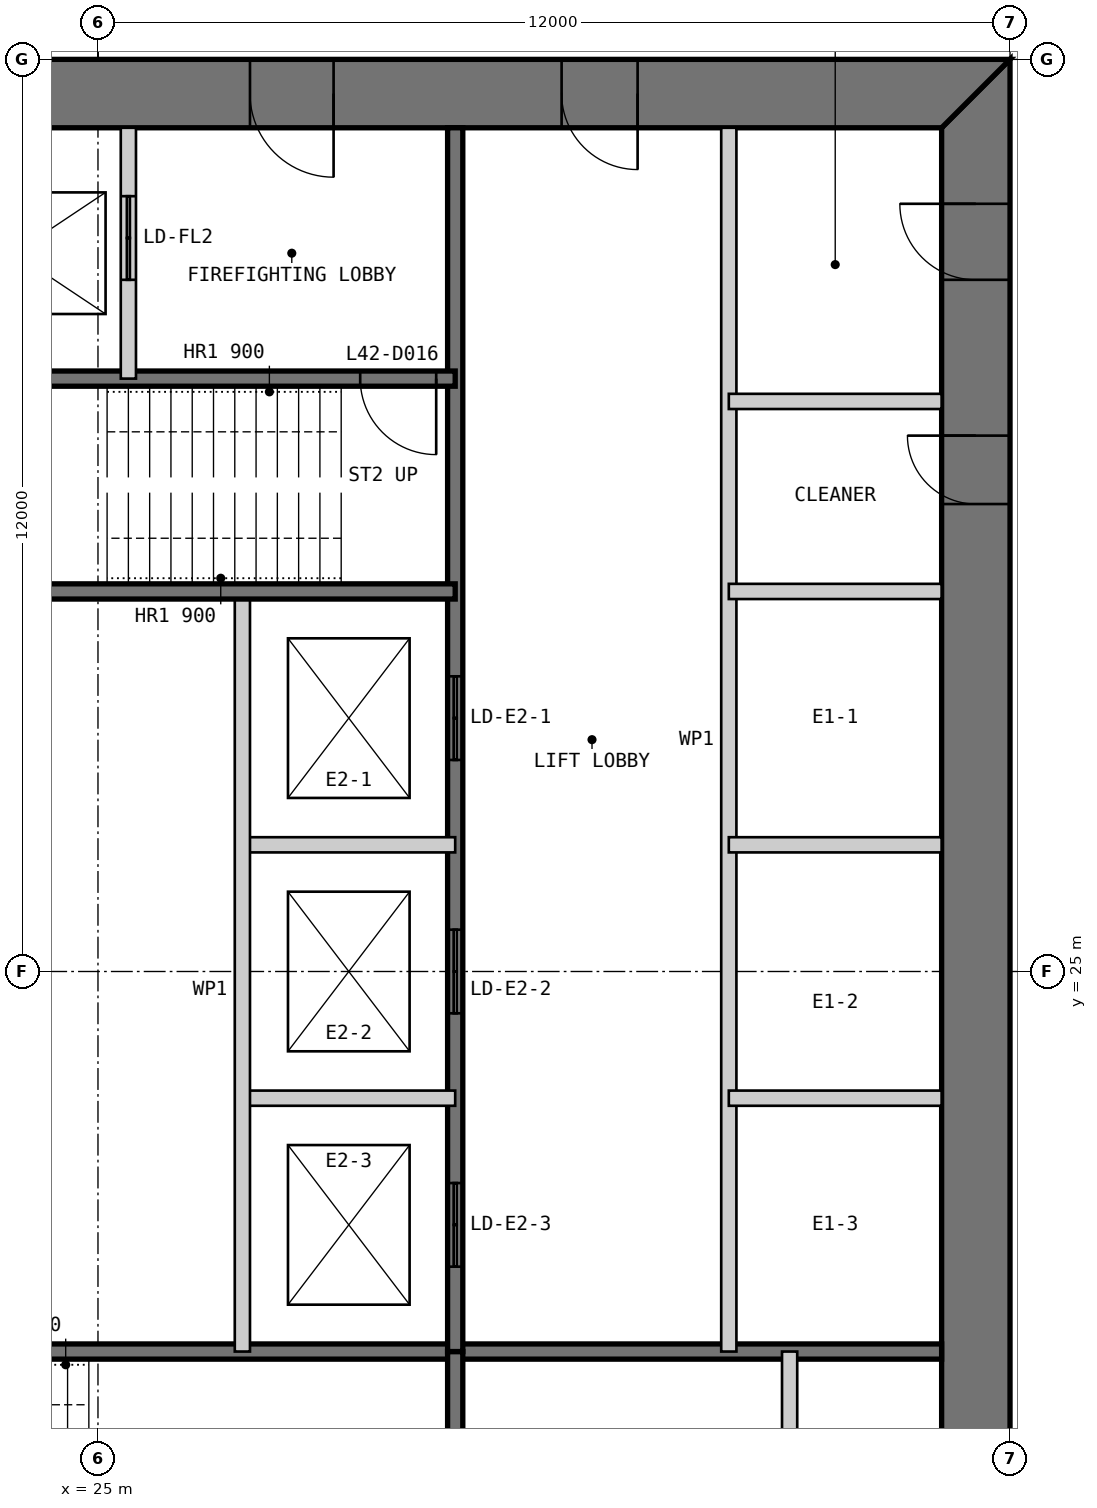
"""IFC4 building model, lengths in metres.
Left out: names, types, materials, properties, quantities, classifications, styles, units other than length and angle.
Written with IfcOpenShell. Run it as: python <this file> out.ifc"""

import sys

from ifc_helpers import new_model, si_unit, direction, frame, frame_2d, origin, place, context, subcontext, project, spatial, polyline, rectangle, outline, extrude, element, fill, save


model = new_model("IFC4")
c1 = context("Model", 3, precision=1e-05, world=origin(), true_north=direction((0.0, 1.0)))
c2 = subcontext(c1, "Body", "Model", "MODEL_VIEW")
j1 = project(units=[si_unit("LENGTHUNIT", "METRE"), si_unit("PLANEANGLEUNIT", "RADIAN")], contexts=[c1])
p1 = place(None, origin())
s1 = spatial("IfcSite", under=j1, at=p1, CompositionType="ELEMENT")
p2 = place(p1, origin())
s2 = spatial("IfcBuilding", under=s1, at=p2, CompositionType="ELEMENT")
p3 = place(p2, frame((0.0, 0.0, 181.8)))
s3 = spatial("IfcBuildingStorey", under=s2, at=p3, CompositionType="ELEMENT", Elevation=181.8)
p4 = place(p3, frame((36.55, 13.9, 0.0), z_axis=(0.0, 0.0, 1.0), x_axis=(0.0, 1.0, 0.0)))
e1 = element("IfcWall", 1, at=p4, inside=s3, PredefinedType="SHEAR", context=c2, shape_type="SweptSolid", body=[
    extrude(outline(polyline([(-0.9, -0.45), (23.1, -0.45), (22.2, 0.45), (0.0, 0.45), (-0.9, -0.45)])), origin(), (0.0, 0.0, 1.0), 4.0),
])
p5 = place(p4, frame((20.2, 0.0, 0.0)))
e2 = element("IfcOpeningElement", 2, at=p5, cuts=e1, PredefinedType="OPENING", context=c2, shape_type="SweptSolid", body=[
    extrude(rectangle(XDim=1.0, YDim=2.2, at=frame_2d((0.5, 1.1))), frame((0.0, 0.46, 0.0), z_axis=(0.0, -1.0, 0.0), x_axis=(1.0, 0.0, 0.0)), (0.0, 0.0, 1.0), 0.92),
])
p6 = place(p4, frame((17.25, 0.0, 0.0)))
e3 = element("IfcOpeningElement", 3, at=p6, cuts=e1, PredefinedType="OPENING", context=c2, shape_type="SweptSolid", body=[
    extrude(rectangle(XDim=0.9, YDim=2.2, at=frame_2d((0.45, 1.1))), frame((0.0, 0.46, 0.0), z_axis=(0.0, -1.0, 0.0), x_axis=(1.0, 0.0, 0.0)), (0.0, 0.0, 1.0), 0.92),
])
p7 = place(p3, frame((37.0, 36.55, 0.0), z_axis=(0.0, 0.0, 1.0), x_axis=(-1.0, 0.0, 0.0)))
e4 = element("IfcWall", 4, at=p7, inside=s3, PredefinedType="SHEAR", context=c2, shape_type="SweptSolid", body=[
    extrude(outline(polyline([(0.0, -0.45), (24.0, -0.45), (23.1, 0.45), (0.9, 0.45), (0.0, -0.45)])), origin(), (0.0, 0.0, 1.0), 4.0),
])
p8 = place(p7, frame((4.9, 0.0, 0.0)))
e5 = element("IfcOpeningElement", 5, at=p8, cuts=e4, PredefinedType="OPENING", context=c2, shape_type="SweptSolid", body=[
    extrude(rectangle(XDim=1.0, YDim=2.2, at=frame_2d((0.5, 1.1))), frame((0.0, 0.46, 0.0), z_axis=(0.0, -1.0, 0.0), x_axis=(1.0, 0.0, 0.0)), (0.0, 0.0, 1.0), 0.92),
])
p9 = place(p7, frame((8.9, 0.0, 0.0)))
e6 = element("IfcOpeningElement", 6, at=p9, cuts=e4, PredefinedType="OPENING", context=c2, shape_type="SweptSolid", body=[
    extrude(rectangle(XDim=1.1, YDim=2.2, at=frame_2d((0.55, 1.1))), frame((0.0, 0.46, 0.0), z_axis=(0.0, -1.0, 0.0), x_axis=(1.0, 0.0, 0.0)), (0.0, 0.0, 1.0), 0.92),
])
p10 = place(p7, frame((15.05, 0.0, 0.0)))
e7 = element("IfcOpeningElement", 7, at=p10, cuts=e4, PredefinedType="OPENING", context=c2, shape_type="SweptSolid", body=[
    extrude(rectangle(XDim=0.9, YDim=2.2, at=frame_2d((0.45, 1.1))), frame((0.0, 0.46, 0.0), z_axis=(0.0, -1.0, 0.0), x_axis=(1.0, 0.0, 0.0)), (0.0, 0.0, 1.0), 0.92),
])
p11 = place(p7, frame((17.9, 0.0, 0.0)))
e8 = element("IfcOpeningElement", 8, at=p11, cuts=e4, PredefinedType="OPENING", context=c2, shape_type="SweptSolid", body=[
    extrude(rectangle(XDim=1.0, YDim=2.2, at=frame_2d((0.5, 1.1))), frame((0.0, 0.46, 0.0), z_axis=(0.0, -1.0, 0.0), x_axis=(1.0, 0.0, 0.0)), (0.0, 0.0, 1.0), 0.92),
])
p12 = place(p7, frame((21.4, 0.0, 0.0)))
e9 = element("IfcOpeningElement", 9, at=p12, cuts=e4, PredefinedType="OPENING", context=c2, shape_type="SweptSolid", body=[
    extrude(rectangle(XDim=1.0, YDim=2.2, at=frame_2d((0.5, 1.1))), frame((0.0, 0.46, 0.0), z_axis=(0.0, -1.0, 0.0), x_axis=(1.0, 0.0, 0.0)), (0.0, 0.0, 1.0), 0.92),
])
p13 = place(p3, frame((20.3, 20.0, 0.0), z_axis=(0.0, 0.0, 1.0), x_axis=(1.0, 0.0, 0.0)))
e10 = element("IfcWall", 10, at=p13, inside=s3, PredefinedType="SOLIDWALL", context=c2, shape_type="SweptSolid", body=[
    extrude(rectangle(XDim=15.8, YDim=0.2, at=frame_2d((7.9, 0.0))), origin(), (0.0, 0.0, 1.0), 3.8),
])
p14 = place(p3, frame((29.7, 13.9, 0.0), z_axis=(0.0, 0.0, 1.0), x_axis=(0.0, 1.0, 0.0)))
e11 = element("IfcWall", 11, at=p14, inside=s3, PredefinedType="SOLIDWALL", context=c2, shape_type="SweptSolid", body=[
    extrude(rectangle(XDim=6.1, YDim=0.2, at=frame_2d((3.05, 0.0))), origin(), (0.0, 0.0, 1.0), 3.8),
])
p15 = place(p3, frame((34.1, 13.9, 0.0), z_axis=(0.0, 0.0, 1.0), x_axis=(0.0, 1.0, 0.0)))
e12 = element("IfcWall", 12, at=p15, inside=s3, PredefinedType="PARTITIONING", context=c2, shape_type="SweptSolid", body=[
    extrude(rectangle(XDim=6.1, YDim=0.2, at=frame_2d((3.05, 0.0))), origin(), (0.0, 0.0, 1.0), 3.8),
])
p16 = place(p3, frame((33.3, 36.1, 0.0), z_axis=(0.0, 0.0, 1.0), x_axis=(0.0, -1.0, 0.0)))
e13 = element("IfcWall", 13, at=p16, inside=s3, PredefinedType="PARTITIONING", context=c2, shape_type="SweptSolid", body=[
    extrude(rectangle(XDim=16.1, YDim=0.2, at=frame_2d((8.05, 0.0))), origin(), (0.0, 0.0, 1.0), 3.8),
])
p17 = place(p3, frame((29.7, 36.1, 0.0), z_axis=(0.0, 0.0, 1.0), x_axis=(0.0, -1.0, 0.0)))
e14 = element("IfcWall", 14, at=p17, inside=s3, PredefinedType="SOLIDWALL", context=c2, shape_type="SweptSolid", body=[
    extrude(rectangle(XDim=16.1, YDim=0.2, at=frame_2d((8.05, 0.0))), origin(), (0.0, 0.0, 1.0), 3.8),
])
p18 = place(p17, frame((7.217, 0.0, 0.0)))
e15 = element("IfcOpeningElement", 15, at=p18, cuts=e14, PredefinedType="OPENING", context=c2, shape_type="SweptSolid", body=[
    extrude(rectangle(XDim=1.1, YDim=2.2, at=frame_2d((0.55, 1.1))), frame((0.0, 0.11, 0.0), z_axis=(0.0, -1.0, 0.0), x_axis=(1.0, 0.0, 0.0)), (0.0, 0.0, 1.0), 0.22),
])
p19 = place(p17, frame((10.55, 0.0, 0.0)))
e16 = element("IfcOpeningElement", 16, at=p19, cuts=e14, PredefinedType="OPENING", context=c2, shape_type="SweptSolid", body=[
    extrude(rectangle(XDim=1.1, YDim=2.2, at=frame_2d((0.55, 1.1))), frame((0.0, 0.11, 0.0), z_axis=(0.0, -1.0, 0.0), x_axis=(1.0, 0.0, 0.0)), (0.0, 0.0, 1.0), 0.22),
])
p20 = place(p17, frame((13.883, 0.0, 0.0)))
e17 = element("IfcOpeningElement", 17, at=p20, cuts=e14, PredefinedType="OPENING", context=c2, shape_type="SweptSolid", body=[
    extrude(rectangle(XDim=1.1, YDim=2.2, at=frame_2d((0.55, 1.1))), frame((0.0, 0.11, 0.0), z_axis=(0.0, -1.0, 0.0), x_axis=(1.0, 0.0, 0.0)), (0.0, 0.0, 1.0), 0.22),
])
for number, where, z_axis, x_axis in (
    (18, (36.1, 30.0, 0.0), (0.0, 0.0, 1.0), (-1.0, 0.0, 0.0)),
    (19, (36.1, 26.667, 0.0), (0.0, 0.0, 1.0), (-1.0, 0.0, 0.0)),
    (20, (36.1, 23.333, 0.0), (0.0, 0.0, 1.0), (-1.0, 0.0, 0.0)),
    (21, (29.7, 26.667, 0.0), (0.0, 0.0, 1.0), (-1.0, 0.0, 0.0)),
    (22, (29.7, 23.333, 0.0), (0.0, 0.0, 1.0), (-1.0, 0.0, 0.0)),
):
    element("IfcWall", number, at=place(p3, frame(where, z_axis=z_axis, x_axis=x_axis)), inside=s3, PredefinedType="PARTITIONING", context=c2, shape_type="SweptSolid", body=[
        extrude(rectangle(XDim=2.8, YDim=0.2, at=frame_2d((1.4, 0.0))), origin(), (0.0, 0.0, 1.0), 3.8),
    ])
p21 = place(p3, frame((26.9, 30.0, 0.0), z_axis=(0.0, 0.0, 1.0), x_axis=(0.0, -1.0, 0.0)))
e23 = element("IfcWall", 23, at=p21, inside=s3, PredefinedType="PARTITIONING", context=c2, shape_type="SweptSolid", body=[
    extrude(rectangle(XDim=10.0, YDim=0.2, at=frame_2d((5.0, 0.0))), origin(), (0.0, 0.0, 1.0), 3.8),
])
p22 = place(p3, frame((29.7, 32.8, 0.0), z_axis=(0.0, 0.0, 1.0), x_axis=(-1.0, 0.0, 0.0)))
e24 = element("IfcWall", 24, at=p22, inside=s3, PredefinedType="SOLIDWALL", context=c2, shape_type="SweptSolid", body=[
    extrude(rectangle(XDim=9.4, YDim=0.2, at=frame_2d((4.7, 0.0))), origin(), (0.0, 0.0, 1.0), 3.8),
])
p23 = place(p22, frame((0.25, 0.0, 0.0)))
e25 = element("IfcOpeningElement", 25, at=p23, cuts=e24, PredefinedType="OPENING", context=c2, shape_type="SweptSolid", body=[
    extrude(rectangle(XDim=1.0, YDim=2.2, at=frame_2d((0.5, 1.1))), frame((0.0, 0.11, 0.0), z_axis=(0.0, -1.0, 0.0), x_axis=(1.0, 0.0, 0.0)), (0.0, 0.0, 1.0), 0.22),
])
p24 = place(p3, frame((29.7, 30.0, 0.0), z_axis=(0.0, 0.0, 1.0), x_axis=(-1.0, 0.0, 0.0)))
e26 = element("IfcWall", 26, at=p24, inside=s3, PredefinedType="SOLIDWALL", context=c2, shape_type="SweptSolid", body=[
    extrude(rectangle(XDim=15.8, YDim=0.2, at=frame_2d((7.9, 0.0))), origin(), (0.0, 0.0, 1.0), 3.8),
])
p25 = place(p3, frame((25.4, 36.1, 0.0), z_axis=(0.0, 0.0, 1.0), x_axis=(0.0, -1.0, 0.0)))
e27 = element("IfcWall", 27, at=p25, inside=s3, PredefinedType="PARTITIONING", context=c2, shape_type="SweptSolid", body=[
    extrude(rectangle(XDim=3.3, YDim=0.2, at=frame_2d((1.65, 0.0))), origin(), (0.0, 0.0, 1.0), 3.8),
])
p26 = place(p25, frame((0.9, 0.0, 0.0)))
e28 = element("IfcOpeningElement", 28, at=p26, cuts=e27, PredefinedType="OPENING", context=c2, shape_type="SweptSolid", body=[
    extrude(rectangle(XDim=1.1, YDim=2.2, at=frame_2d((0.55, 1.1))), frame((0.0, 0.11, 0.0), z_axis=(0.0, -1.0, 0.0), x_axis=(1.0, 0.0, 0.0)), (0.0, 0.0, 1.0), 0.22),
])
p27 = place(p3, frame((36.1, 32.5, 0.0), z_axis=(0.0, 0.0, 1.0), x_axis=(-1.0, 0.0, 0.0)))
e29 = element("IfcWall", 29, at=p27, inside=s3, PredefinedType="PARTITIONING", context=c2, shape_type="SweptSolid", body=[
    extrude(rectangle(XDim=2.8, YDim=0.2, at=frame_2d((1.4, 0.0))), origin(), (0.0, 0.0, 1.0), 3.8),
])
p28 = place(p8, origin())
e30 = element("IfcDoor", 30, at=p28, inside=s3, OperationType="SINGLE_SWING_LEFT", PredefinedType="DOOR", context=c2, shape_type="SweptSolid", body=[
    extrude(rectangle(XDim=1.0, YDim=2.2, at=frame_2d((0.5, 1.1))), frame((0.0, 0.025, 0.0), z_axis=(0.0, -1.0, 0.0), x_axis=(1.0, 0.0, 0.0)), (0.0, 0.0, 1.0), 0.05),
    extrude(outline(polyline([(0.0, 0.0), (0.04, 0.0), (0.04, 2.16), (0.96, 2.16), (0.96, 0.0), (1.0, 0.0), (1.0, 2.2), (0.0, 2.2), (0.0, 0.0)])), frame((0.0, 0.3, 0.0), z_axis=(0.0, -1.0, 0.0), x_axis=(1.0, 0.0, 0.0)), (0.0, 0.0, 1.0), 0.6),
])
fill(e5, e30)
p29 = place(p9, origin())
e31 = element("IfcDoor", 31, at=p29, inside=s3, OperationType="SINGLE_SWING_LEFT", PredefinedType="DOOR", context=c2, shape_type="SweptSolid", body=[
    extrude(rectangle(XDim=1.1, YDim=2.2, at=frame_2d((0.55, 1.1))), frame((0.0, 0.025, 0.0), z_axis=(0.0, -1.0, 0.0), x_axis=(1.0, 0.0, 0.0)), (0.0, 0.0, 1.0), 0.05),
    extrude(outline(polyline([(0.0, 0.0), (0.04, 0.0), (0.04, 2.16), (1.06, 2.16), (1.06, 0.0), (1.1, 0.0), (1.1, 2.2), (0.0, 2.2), (0.0, 0.0)])), frame((0.0, 0.3, 0.0), z_axis=(0.0, -1.0, 0.0), x_axis=(1.0, 0.0, 0.0)), (0.0, 0.0, 1.0), 0.6),
])
fill(e6, e31)
p30 = place(p23, origin())
e32 = element("IfcDoor", 32, at=p30, inside=s3, OperationType="SINGLE_SWING_LEFT", PredefinedType="DOOR", context=c2, shape_type="SweptSolid", body=[
    extrude(rectangle(XDim=1.0, YDim=2.2, at=frame_2d((0.5, 1.1))), frame((0.0, 0.025, 0.0), z_axis=(0.0, -1.0, 0.0), x_axis=(1.0, 0.0, 0.0)), (0.0, 0.0, 1.0), 0.05),
])
fill(e25, e32)
p31 = place(p5, origin())
e33 = element("IfcDoor", 33, at=p31, inside=s3, OperationType="SINGLE_SWING_RIGHT", PredefinedType="DOOR", context=c2, shape_type="SweptSolid", body=[
    extrude(rectangle(XDim=1.0, YDim=2.2, at=frame_2d((0.5, 1.1))), frame((0.0, 0.025, 0.0), z_axis=(0.0, -1.0, 0.0), x_axis=(1.0, 0.0, 0.0)), (0.0, 0.0, 1.0), 0.05),
    extrude(outline(polyline([(0.0, 0.0), (0.04, 0.0), (0.04, 2.16), (0.96, 2.16), (0.96, 0.0), (1.0, 0.0), (1.0, 2.2), (0.0, 2.2), (0.0, 0.0)])), frame((0.0, 0.3, 0.0), z_axis=(0.0, -1.0, 0.0), x_axis=(1.0, 0.0, 0.0)), (0.0, 0.0, 1.0), 0.6),
])
fill(e2, e33)
p32 = place(p6, origin())
e34 = element("IfcDoor", 34, at=p32, inside=s3, OperationType="SINGLE_SWING_RIGHT", PredefinedType="DOOR", context=c2, shape_type="SweptSolid", body=[
    extrude(rectangle(XDim=0.9, YDim=2.2, at=frame_2d((0.45, 1.1))), frame((0.0, 0.025, 0.0), z_axis=(0.0, -1.0, 0.0), x_axis=(1.0, 0.0, 0.0)), (0.0, 0.0, 1.0), 0.05),
    extrude(outline(polyline([(0.0, 0.0), (0.04, 0.0), (0.04, 2.16), (0.86, 2.16), (0.86, 0.0), (0.9, 0.0), (0.9, 2.2), (0.0, 2.2), (0.0, 0.0)])), frame((0.0, 0.3, 0.0), z_axis=(0.0, -1.0, 0.0), x_axis=(1.0, 0.0, 0.0)), (0.0, 0.0, 1.0), 0.6),
])
fill(e3, e34)
p33 = place(p26, origin())
e35 = element("IfcDoor", 35, at=p33, inside=s3, OperationType="DOUBLE_DOOR_SLIDING", PredefinedType="DOOR", context=c2, shape_type="SweptSolid", body=[
    extrude(rectangle(XDim=1.1, YDim=2.2, at=frame_2d((0.55, 1.1))), frame((0.0, 0.025, 0.0), z_axis=(0.0, -1.0, 0.0), x_axis=(1.0, 0.0, 0.0)), (0.0, 0.0, 1.0), 0.05),
])
fill(e28, e35)
p34 = place(p18, origin())
e36 = element("IfcDoor", 36, at=p34, inside=s3, OperationType="DOUBLE_DOOR_SLIDING", PredefinedType="DOOR", context=c2, shape_type="SweptSolid", body=[
    extrude(rectangle(XDim=1.1, YDim=2.2, at=frame_2d((0.55, 1.1))), frame((0.0, 0.025, 0.0), z_axis=(0.0, -1.0, 0.0), x_axis=(1.0, 0.0, 0.0)), (0.0, 0.0, 1.0), 0.05),
])
fill(e15, e36)
p35 = place(p19, origin())
e37 = element("IfcDoor", 37, at=p35, inside=s3, OperationType="DOUBLE_DOOR_SLIDING", PredefinedType="DOOR", context=c2, shape_type="SweptSolid", body=[
    extrude(rectangle(XDim=1.1, YDim=2.2, at=frame_2d((0.55, 1.1))), frame((0.0, 0.025, 0.0), z_axis=(0.0, -1.0, 0.0), x_axis=(1.0, 0.0, 0.0)), (0.0, 0.0, 1.0), 0.05),
])
fill(e16, e37)
p36 = place(p20, origin())
e38 = element("IfcDoor", 38, at=p36, inside=s3, OperationType="DOUBLE_DOOR_SLIDING", PredefinedType="DOOR", context=c2, shape_type="SweptSolid", body=[
    extrude(rectangle(XDim=1.1, YDim=2.2, at=frame_2d((0.55, 1.1))), frame((0.0, 0.025, 0.0), z_axis=(0.0, -1.0, 0.0), x_axis=(1.0, 0.0, 0.0)), (0.0, 0.0, 1.0), 0.05),
])
fill(e17, e38)
save(model, sys.argv[1])
